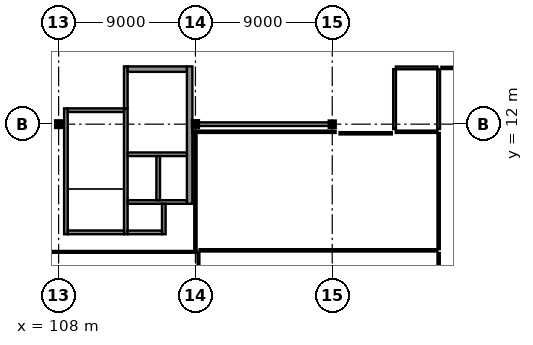
"""IFC4 building model, lengths in metres.
Left out: names, types, materials, properties, quantities, classifications, styles, units other than length and angle.
Written with IfcOpenShell. Run it as: python <this file> out.ifc"""

import sys

from ifc_helpers import new_model, si_unit, direction, frame, frame_2d, origin, origin_2d, place, context, subcontext, project, spatial, rectangle, i_section, extrude, element, fill, save


model = new_model("IFC4")
c1 = context("Model", 3, precision=1e-05, world=origin(), true_north=direction((0.0, 1.0)))
c2 = subcontext(c1, "Body", "Model", "MODEL_VIEW")
j1 = project(units=[si_unit("LENGTHUNIT", "METRE"), si_unit("PLANEANGLEUNIT", "RADIAN")], contexts=[c1])
p1 = place(None, origin())
s1 = spatial("IfcSite", under=j1, at=p1, CompositionType="ELEMENT")
p2 = place(p1, origin())
s2 = spatial("IfcBuilding", under=s1, at=p2, CompositionType="ELEMENT")
p3 = place(p2, frame((0.0, 0.0, 18.9)))
s3 = spatial("IfcBuildingStorey", under=s2, at=p3, CompositionType="ELEMENT", Elevation=18.9)
p4 = place(p3, frame((108.0, 12.0, 0.0), z_axis=(0.0, 0.0, 1.0), x_axis=(1.0, 0.0, 0.0)))
e1 = element("IfcColumn", 1, at=p4, inside=s3, PredefinedType="COLUMN", context=c2, shape_type="SweptSolid", body=[
    extrude(i_section(OverallWidth=0.3, OverallDepth=0.34, WebThickness=0.012, FlangeThickness=0.021, at=origin_2d()), origin(), (0.0, 0.0, 1.0), 4.5),
])
p5 = place(p3, frame((117.0, 12.0, 0.0), z_axis=(0.0, 0.0, 1.0), x_axis=(0.0, 1.0, 0.0)))
e2 = element("IfcColumn", 2, at=p5, inside=s3, PredefinedType="COLUMN", context=c2, shape_type="SweptSolid", body=[
    extrude(i_section(OverallWidth=0.3, OverallDepth=0.36, WebThickness=0.012, FlangeThickness=0.022, at=origin_2d()), origin(), (0.0, 0.0, 1.0), 4.5),
])
p6 = place(p3, frame((126.0, 12.0, 0.0), z_axis=(0.0, 0.0, 1.0), x_axis=(1.0, 0.0, 0.0)))
e3 = element("IfcColumn", 3, at=p6, inside=s3, PredefinedType="COLUMN", context=c2, shape_type="SweptSolid", body=[
    extrude(i_section(OverallWidth=0.3, OverallDepth=0.32, WebThickness=0.011, FlangeThickness=0.021, at=origin_2d()), origin(), (0.0, 0.0, 1.0), 4.5),
])
p7 = place(p3, frame((108.48, 4.76, 0.0), z_axis=(0.0, 0.0, 1.0), x_axis=(0.0, 1.0, 0.0)))
e4 = element("IfcWall", 4, at=p7, inside=s3, PredefinedType="SHEAR", context=c2, shape_type="SweptSolid", body=[
    extrude(rectangle(XDim=8.28, YDim=0.24, at=frame_2d((4.14, 0.0))), origin(), (0.0, 0.0, 1.0), 4.31),
])
p8 = place(p3, frame((112.42, 4.76, 0.0), z_axis=(0.0, 0.0, 1.0), x_axis=(0.0, 1.0, 0.0)))
e5 = element("IfcWall", 5, at=p8, inside=s3, PredefinedType="SHEAR", context=c2, shape_type="SweptSolid", body=[
    extrude(rectangle(XDim=8.28, YDim=0.24, at=frame_2d((4.14, 0.0))), origin(), (0.0, 0.0, 1.0), 4.31),
])
p9 = place(p8, frame((6.49, 0.0, 0.0)))
e6 = element("IfcOpeningElement", 6, at=p9, cuts=e5, PredefinedType="OPENING", context=c2, shape_type="SweptSolid", body=[
    extrude(rectangle(XDim=1.3, YDim=2.2, at=frame_2d((0.65, 1.1))), frame((0.0, 0.135, 0.0), z_axis=(0.0, -1.0, 0.0), x_axis=(1.0, 0.0, 0.0)), (0.0, 0.0, 1.0), 0.27),
])
for number, where, z_axis, x_axis in (
    (7, (108.6, 4.88, 0.0), (0.0, 0.0, 1.0), (1.0, 0.0, 0.0)),
    (8, (108.6, 12.92, 0.0), (0.0, 0.0, 1.0), (1.0, 0.0, 0.0)),
):
    element("IfcWall", number, at=place(p3, frame(where, z_axis=z_axis, x_axis=x_axis)), inside=s3, PredefinedType="SHEAR", context=c2, shape_type="SweptSolid", body=[
        extrude(rectangle(XDim=3.7, YDim=0.24, at=frame_2d((1.85, 0.0))), origin(), (0.0, 0.0, 1.0), 4.31),
    ])
p10 = place(p3, frame((112.42, 13.04, 0.0), z_axis=(0.0, 0.0, 1.0), x_axis=(0.0, 1.0, 0.0)))
e9 = element("IfcWall", 9, at=p10, inside=s3, PredefinedType="SHEAR", context=c2, shape_type="SweptSolid", body=[
    extrude(rectangle(XDim=2.76, YDim=0.24, at=frame_2d((1.38, 0.0))), origin(), (0.0, 0.0, 1.0), 4.16),
])
p11 = place(p3, frame((112.54, 15.62, 0.0), z_axis=(0.0, 0.0, 1.0), x_axis=(1.0, 0.0, 0.0)))
e10 = element("IfcWall", 10, at=p11, inside=s3, PredefinedType="SHEAR", context=c2, shape_type="SweptSolid", body=[
    extrude(rectangle(XDim=3.9, YDim=0.36, at=frame_2d((1.95, 0.0))), origin(), (0.0, 0.0, 1.0), 4.16),
])
p12 = place(p11, frame((1.15, 0.0, 0.0)))
e11 = element("IfcOpeningElement", 11, at=p12, cuts=e10, PredefinedType="OPENING", context=c2, shape_type="SweptSolid", body=[
    extrude(rectangle(XDim=1.6, YDim=2.25, at=frame_2d((0.8, 1.125))), frame((0.0, 0.195, 0.0), z_axis=(0.0, -1.0, 0.0), x_axis=(1.0, 0.0, 0.0)), (0.0, 0.0, 1.0), 0.39),
])
p13 = place(p3, frame((116.62, 6.76, 0.0), z_axis=(0.0, 0.0, 1.0), x_axis=(0.0, 1.0, 0.0)))
e12 = element("IfcWall", 12, at=p13, inside=s3, PredefinedType="SHEAR", context=c2, shape_type="SweptSolid", body=[
    extrude(rectangle(XDim=9.04, YDim=0.36, at=frame_2d((4.52, 0.0))), origin(), (0.0, 0.0, 1.0), 4.16),
])
p14 = place(p3, frame((112.54, 10.02, 0.0), z_axis=(0.0, 0.0, 1.0), x_axis=(1.0, 0.0, 0.0)))
e13 = element("IfcWall", 13, at=p14, inside=s3, PredefinedType="SHEAR", context=c2, shape_type="SweptSolid", body=[
    extrude(rectangle(XDim=3.9, YDim=0.24, at=frame_2d((1.95, 0.0))), origin(), (0.0, 0.0, 1.0), 4.31),
])
p15 = place(p14, frame((0.235, 0.0, 0.0)))
e14 = element("IfcOpeningElement", 14, at=p15, cuts=e13, PredefinedType="OPENING", context=c2, shape_type="SweptSolid", body=[
    extrude(rectangle(XDim=1.6, YDim=2.3, at=frame_2d((0.8, 1.15))), frame((0.0, 0.135, 0.0), z_axis=(0.0, -1.0, 0.0), x_axis=(1.0, 0.0, 0.0)), (0.0, 0.0, 1.0), 0.27),
])
p16 = place(p14, frame((2.185, 0.0, 0.0)))
e15 = element("IfcOpeningElement", 15, at=p16, cuts=e13, PredefinedType="OPENING", context=c2, shape_type="SweptSolid", body=[
    extrude(rectangle(XDim=1.6, YDim=2.3, at=frame_2d((0.8, 1.15))), frame((0.0, 0.135, 0.0), z_axis=(0.0, -1.0, 0.0), x_axis=(1.0, 0.0, 0.0)), (0.0, 0.0, 1.0), 0.27),
])
p17 = place(p3, frame((112.54, 6.88, 0.0), z_axis=(0.0, 0.0, 1.0), x_axis=(1.0, 0.0, 0.0)))
e16 = element("IfcWall", 16, at=p17, inside=s3, PredefinedType="SHEAR", context=c2, shape_type="SweptSolid", body=[
    extrude(rectangle(XDim=3.9, YDim=0.24, at=frame_2d((1.95, 0.0))), origin(), (0.0, 0.0, 1.0), 4.31),
])
p18 = place(p3, frame((114.55, 7.0, 0.0), z_axis=(0.0, 0.0, 1.0), x_axis=(0.0, 1.0, 0.0)))
e17 = element("IfcWall", 17, at=p18, inside=s3, PredefinedType="SHEAR", context=c2, shape_type="SweptSolid", body=[
    extrude(rectangle(XDim=2.9, YDim=0.24, at=frame_2d((1.45, 0.0))), origin(), (0.0, 0.0, 1.0), 4.31),
])
p19 = place(p3, frame((114.92, 4.76, 0.0), z_axis=(0.0, 0.0, 1.0), x_axis=(0.0, 1.0, 0.0)))
e18 = element("IfcWall", 18, at=p19, inside=s3, PredefinedType="SHEAR", context=c2, shape_type="SweptSolid", body=[
    extrude(rectangle(XDim=2.0, YDim=0.24, at=frame_2d((1.0, 0.0))), origin(), (0.0, 0.0, 1.0), 4.31),
])
p20 = place(p3, frame((112.54, 4.88, 0.0), z_axis=(0.0, 0.0, 1.0), x_axis=(1.0, 0.0, 0.0)))
e19 = element("IfcWall", 19, at=p20, inside=s3, PredefinedType="SHEAR", context=c2, shape_type="SweptSolid", body=[
    extrude(rectangle(XDim=2.26, YDim=0.24, at=frame_2d((1.13, 0.0))), origin(), (0.0, 0.0, 1.0), 4.31),
])
p21 = place(p3, frame((117.178, 12.0, 0.0), z_axis=(0.0, 0.0, 1.0), x_axis=(1.0, 0.0, 0.0)))
e20 = element("IfcWall", 20, at=p21, inside=s3, PredefinedType="SHEAR", context=c2, shape_type="SweptSolid", body=[
    extrude(rectangle(XDim=8.814, YDim=0.24, at=frame_2d((4.407, 0.0))), origin(), (0.0, 0.0, 1.0), 3.355),
])
p22 = place(p3, frame((53.87, 3.6, 0.0), z_axis=(0.0, 0.0, 1.0), x_axis=(1.0, 0.0, 0.0)))
e21 = element("IfcWall", 21, at=p22, inside=s3, PredefinedType="PARTITIONING", context=c2, shape_type="SweptSolid", body=[
    extrude(rectangle(XDim=63.25, YDim=0.12, at=frame_2d((31.625, 0.0))), origin(), (0.0, 0.0, 1.0), 4.14),
])
p23 = place(p22, frame((19.855, 0.0, 0.0)))
e22 = element("IfcOpeningElement", 22, at=p23, cuts=e21, PredefinedType="OPENING", context=c2, shape_type="SweptSolid", body=[
    extrude(rectangle(XDim=0.95, YDim=2.15, at=frame_2d((0.475, 1.075))), frame((0.0, 0.075, 0.0), z_axis=(0.0, -1.0, 0.0), x_axis=(1.0, 0.0, 0.0)), (0.0, 0.0, 1.0), 0.15),
])
p24 = place(p3, frame((117.2, 3.52, 0.0), z_axis=(0.0, 0.0, 1.0), x_axis=(0.0, -1.0, 0.0)))
e23 = element("IfcWall", 23, at=p24, inside=s3, PredefinedType="PARTITIONING", context=c2, shape_type="SweptSolid", body=[
    extrude(rectangle(XDim=3.352, YDim=0.12, at=frame_2d((1.676, 0.0))), origin(), (0.0, 0.0, 1.0), 3.905),
])
p25 = place(p3, frame((126.48, 11.4, 0.0), z_axis=(0.0, 0.0, 1.0), x_axis=(1.0, 0.0, 0.0)))
e24 = element("IfcWall", 24, at=p25, inside=s3, PredefinedType="PARTITIONING", context=c2, shape_type="SweptSolid", body=[
    extrude(rectangle(XDim=3.44, YDim=0.15, at=frame_2d((1.72, 0.0))), origin(), (0.0, 0.0, 1.0), 4.14),
])
p26 = place(p25, frame((1.195, 0.0, 0.0)))
e25 = element("IfcOpeningElement", 25, at=p26, cuts=e24, PredefinedType="OPENING", context=c2, shape_type="SweptSolid", body=[
    extrude(rectangle(XDim=1.05, YDim=2.25, at=frame_2d((0.525, 1.125))), frame((0.0, 0.09, 0.0), z_axis=(0.0, -1.0, 0.0), x_axis=(1.0, 0.0, 0.0)), (0.0, 0.0, 1.0), 0.18),
])
p27 = place(p3, frame((130.18, 11.5, 0.0), z_axis=(0.0, 0.0, 1.0), x_axis=(1.0, 0.0, 0.0)))
e26 = element("IfcWall", 26, at=p27, inside=s3, PredefinedType="PARTITIONING", context=c2, shape_type="SweptSolid", body=[
    extrude(rectangle(XDim=2.74, YDim=0.15, at=frame_2d((1.37, 0.0))), origin(), (0.0, 0.0, 1.0), 4.14),
])
p28 = place(p3, frame((133.0, 11.42, 0.0), z_axis=(0.0, 0.0, 1.0), x_axis=(0.0, -1.0, 0.0)))
e27 = element("IfcWall", 27, at=p28, inside=s3, PredefinedType="PARTITIONING", context=c2, shape_type="SweptSolid", body=[
    extrude(rectangle(XDim=7.64, YDim=0.15, at=frame_2d((3.82, 0.0))), origin(), (0.0, 0.0, 1.0), 4.14),
])
p29 = place(p3, frame((132.92, 3.7, 0.0), z_axis=(0.0, 0.0, 1.0), x_axis=(-1.0, 0.0, 0.0)))
e28 = element("IfcWall", 28, at=p29, inside=s3, PredefinedType="PARTITIONING", context=c2, shape_type="SweptSolid", body=[
    extrude(rectangle(XDim=15.64, YDim=0.15, at=frame_2d((7.82, 0.0))), origin(), (0.0, 0.0, 1.0), 4.14),
])
p30 = place(p3, frame((117.0, 3.655, 0.0), z_axis=(0.0, 0.0, 1.0), x_axis=(0.0, 1.0, 0.0)))
e29 = element("IfcWall", 29, at=p30, inside=s3, PredefinedType="PARTITIONING", context=c2, shape_type="SweptSolid", body=[
    extrude(rectangle(XDim=7.765, YDim=0.15, at=frame_2d((3.882, 0.0))), origin(), (0.0, 0.0, 1.0), 3.905),
])
p31 = place(p3, frame((116.795, 11.5, 0.0), z_axis=(0.0, 0.0, 1.0), x_axis=(1.0, 0.0, 0.0)))
e30 = element("IfcWall", 30, at=p31, inside=s3, PredefinedType="PARTITIONING", context=c2, shape_type="SweptSolid", body=[
    extrude(rectangle(XDim=9.425, YDim=0.15, at=frame_2d((4.712, 0.0))), origin(), (0.0, 0.0, 1.0), 4.14),
])
p32 = place(p3, frame((130.1, 11.68, 0.0), z_axis=(0.0, 0.0, 1.0), x_axis=(0.0, 1.0, 0.0)))
e31 = element("IfcWall", 31, at=p32, inside=s3, PredefinedType="PARTITIONING", context=c2, shape_type="SweptSolid", body=[
    extrude(rectangle(XDim=3.94, YDim=0.18, at=frame_2d((1.97, 0.0))), origin(), (0.0, 0.0, 1.0), 4.14),
])
p33 = place(p32, frame((1.395, 0.0, 0.0)))
e32 = element("IfcOpeningElement", 32, at=p33, cuts=e31, PredefinedType="OPENING", context=c2, shape_type="SweptSolid", body=[
    extrude(rectangle(XDim=1.15, YDim=2.15, at=frame_2d((0.575, 1.075))), frame((0.0, 0.105, 0.0), z_axis=(0.0, -1.0, 0.0), x_axis=(1.0, 0.0, 0.0)), (0.0, 0.0, 1.0), 0.21),
])
p34 = place(p3, frame((130.18, 15.7, 0.0), z_axis=(0.0, 0.0, 1.0), x_axis=(1.0, 0.0, 0.0)))
e33 = element("IfcWall", 33, at=p34, inside=s3, PredefinedType="PARTITIONING", context=c2, shape_type="SweptSolid", body=[
    extrude(rectangle(XDim=2.74, YDim=0.18, at=frame_2d((1.37, 0.0))), origin(), (0.0, 0.0, 1.0), 4.14),
])
p35 = place(p3, frame((133.0, 15.62, 0.0), z_axis=(0.0, 0.0, 1.0), x_axis=(0.0, -1.0, 0.0)))
e34 = element("IfcWall", 34, at=p35, inside=s3, PredefinedType="PARTITIONING", context=c2, shape_type="SweptSolid", body=[
    extrude(rectangle(XDim=3.94, YDim=0.18, at=frame_2d((1.97, 0.0))), origin(), (0.0, 0.0, 1.0), 4.14),
])
p36 = place(p3, frame((133.0, 0.145, 0.0), z_axis=(0.0, 0.0, 1.0), x_axis=(0.0, 1.0, 0.0)))
e35 = element("IfcWall", 35, at=p36, inside=s3, PredefinedType="PARTITIONING", context=c2, shape_type="SweptSolid", body=[
    extrude(rectangle(XDim=3.375, YDim=0.15, at=frame_2d((1.688, 0.0))), origin(), (0.0, 0.0, 1.0), 4.14),
])
p37 = place(p3, frame((133.18, 15.7, 0.0), z_axis=(0.0, 0.0, 1.0), x_axis=(1.0, 0.0, 0.0)))
e36 = element("IfcWall", 36, at=p37, inside=s3, PredefinedType="PARTITIONING", context=c2, shape_type="SweptSolid", body=[
    extrude(rectangle(XDim=14.275, YDim=0.15, at=frame_2d((7.138, 0.0))), origin(), (0.0, 0.0, 1.0), 4.14),
])
p38 = place(p37, frame((6.612, 0.0, 0.0)))
e37 = element("IfcOpeningElement", 37, at=p38, cuts=e36, PredefinedType="OPENING", context=c2, shape_type="SweptSolid", body=[
    extrude(rectangle(XDim=1.05, YDim=2.25, at=frame_2d((0.525, 1.125))), frame((0.0, 0.09, 0.0), z_axis=(0.0, -1.0, 0.0), x_axis=(1.0, 0.0, 0.0)), (0.0, 0.0, 1.0), 0.18),
])
p39 = place(p9, frame((1.3, 0.0, 0.0), z_axis=(0.0, 0.0, 1.0), x_axis=(-1.0, 0.0, 0.0)))
e38 = element("IfcDoor", 38, at=p39, inside=s3, OperationType="SINGLE_SWING_RIGHT", PredefinedType="DOOR", context=c2, shape_type="SweptSolid", body=[
    extrude(rectangle(XDim=1.3, YDim=2.2, at=frame_2d((0.65, 1.1))), frame((0.0, 0.025, 0.0), z_axis=(0.0, -1.0, 0.0), x_axis=(1.0, 0.0, 0.0)), (0.0, 0.0, 1.0), 0.05),
])
fill(e6, e38)
p40 = place(p12, origin())
e39 = element("IfcDoor", 39, at=p40, inside=s3, OperationType="DOUBLE_DOOR_SINGLE_SWING", PredefinedType="DOOR", context=c2, shape_type="SweptSolid", body=[
    extrude(rectangle(XDim=1.6, YDim=2.25, at=frame_2d((0.8, 1.125))), frame((0.0, 0.025, 0.0), z_axis=(0.0, -1.0, 0.0), x_axis=(1.0, 0.0, 0.0)), (0.0, 0.0, 1.0), 0.05),
])
fill(e11, e39)
p41 = place(p15, origin())
e40 = element("IfcDoor", 40, at=p41, inside=s3, OperationType="DOUBLE_DOOR_SLIDING", PredefinedType="DOOR", context=c2, shape_type="SweptSolid", body=[
    extrude(rectangle(XDim=1.6, YDim=2.3, at=frame_2d((0.8, 1.15))), frame((0.0, 0.025, 0.0), z_axis=(0.0, -1.0, 0.0), x_axis=(1.0, 0.0, 0.0)), (0.0, 0.0, 1.0), 0.05),
])
fill(e14, e40)
p42 = place(p16, origin())
e41 = element("IfcDoor", 41, at=p42, inside=s3, OperationType="DOUBLE_DOOR_SLIDING", PredefinedType="DOOR", context=c2, shape_type="SweptSolid", body=[
    extrude(rectangle(XDim=1.6, YDim=2.3, at=frame_2d((0.8, 1.15))), frame((0.0, 0.025, 0.0), z_axis=(0.0, -1.0, 0.0), x_axis=(1.0, 0.0, 0.0)), (0.0, 0.0, 1.0), 0.05),
])
fill(e15, e41)
p43 = place(p26, frame((1.05, 0.0, 0.0), z_axis=(0.0, 0.0, 1.0), x_axis=(-1.0, 0.0, 0.0)))
e42 = element("IfcDoor", 42, at=p43, inside=s3, OperationType="SINGLE_SWING_RIGHT", PredefinedType="DOOR", context=c2, shape_type="SweptSolid", body=[
    extrude(rectangle(XDim=1.05, YDim=2.25, at=frame_2d((0.525, 1.125))), frame((0.0, 0.025, 0.0), z_axis=(0.0, -1.0, 0.0), x_axis=(1.0, 0.0, 0.0)), (0.0, 0.0, 1.0), 0.05),
])
fill(e25, e42)
p44 = place(p33, origin())
e43 = element("IfcDoor", 43, at=p44, inside=s3, OperationType="SINGLE_SWING_LEFT", PredefinedType="DOOR", context=c2, shape_type="SweptSolid", body=[
    extrude(rectangle(XDim=1.15, YDim=2.15, at=frame_2d((0.575, 1.075))), frame((0.0, 0.025, 0.0), z_axis=(0.0, -1.0, 0.0), x_axis=(1.0, 0.0, 0.0)), (0.0, 0.0, 1.0), 0.05),
])
fill(e32, e43)
save(model, sys.argv[1])
